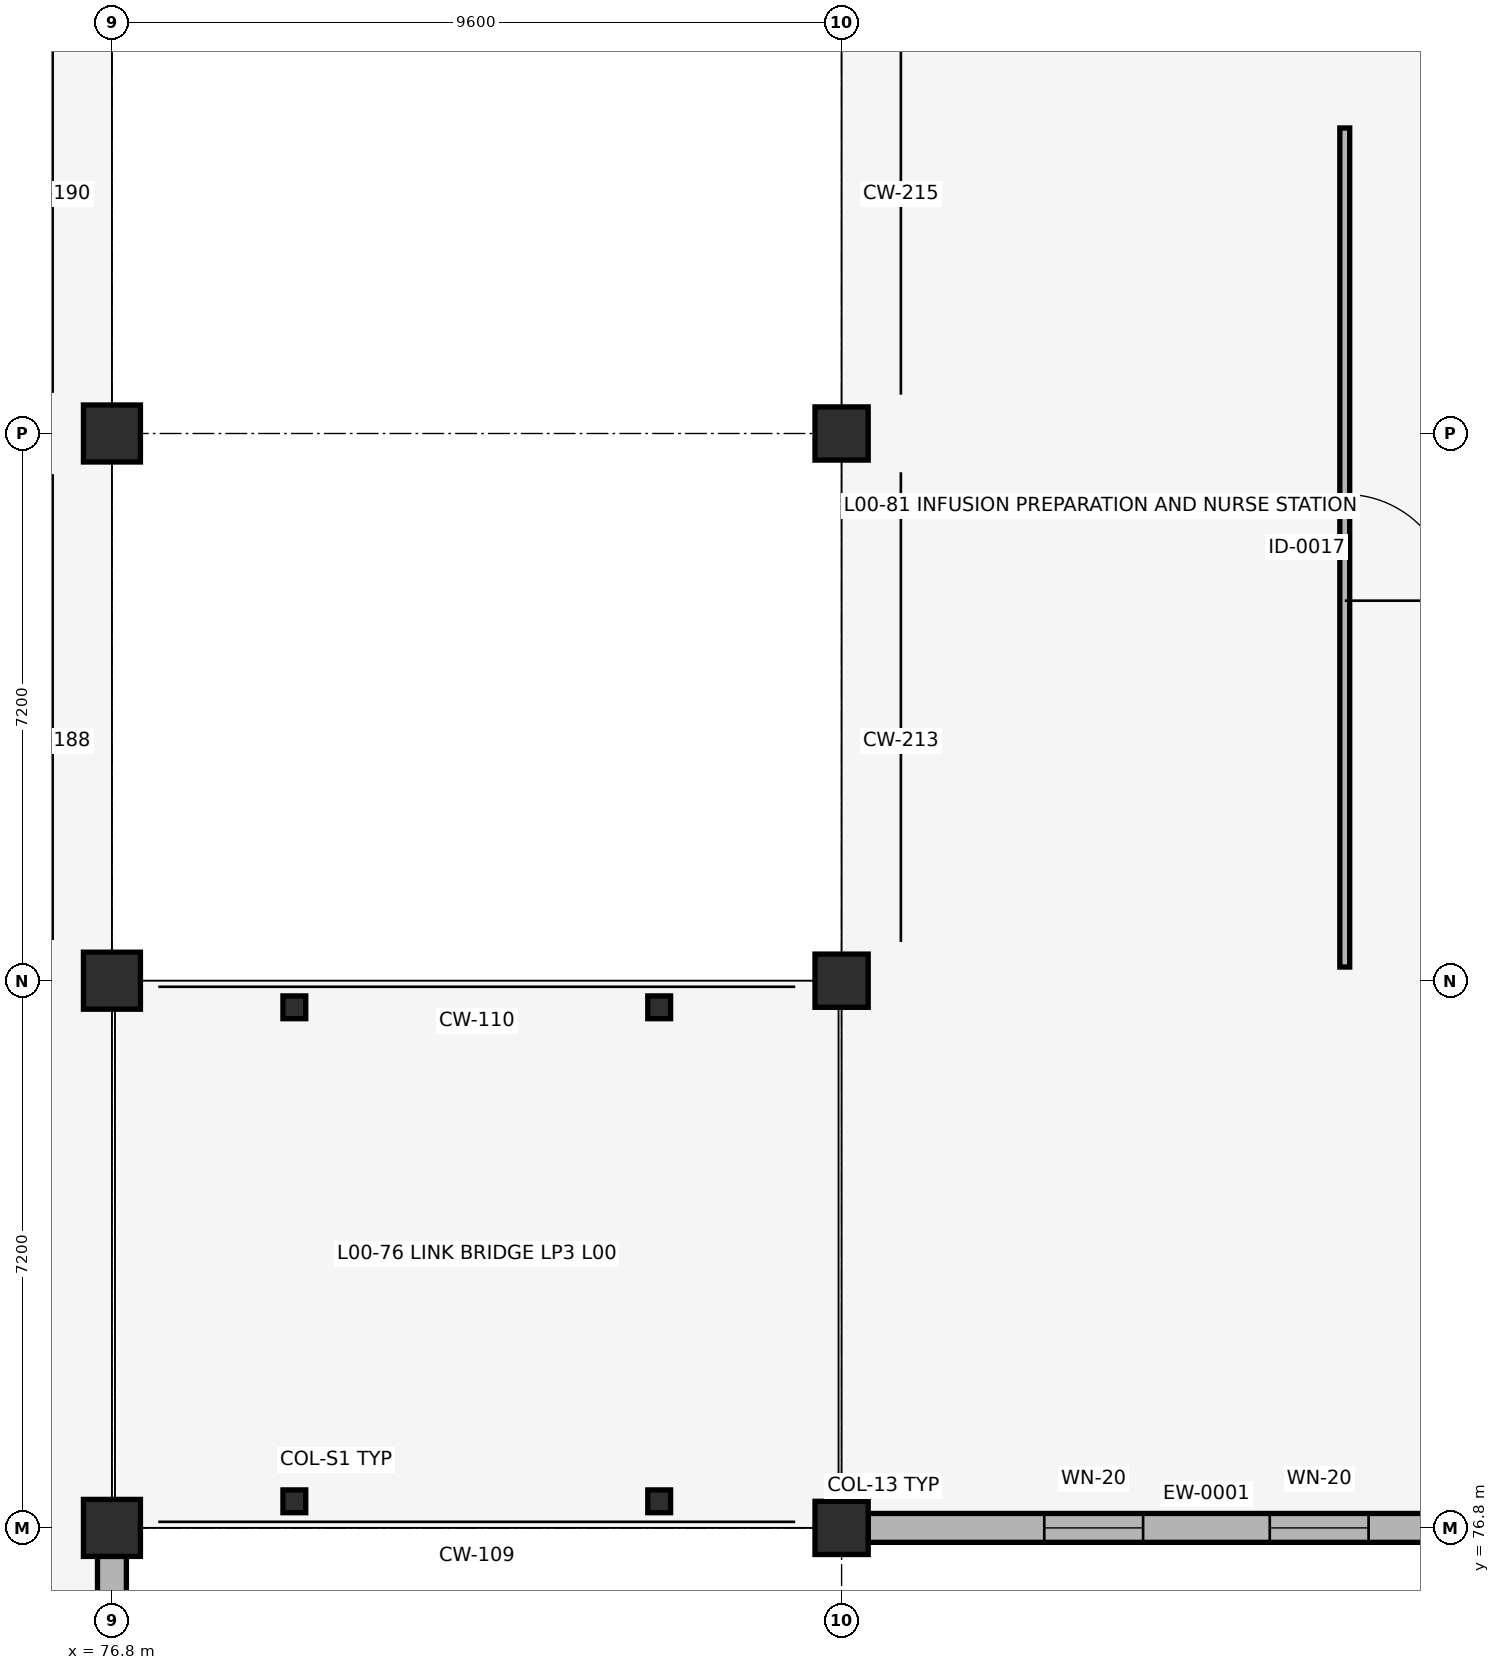
"""IFC4 building model, lengths in metres.
Left out: names, types, materials, properties, quantities, classifications, styles, units other than length and angle.
Written with IfcOpenShell. Run it as: python <this file> out.ifc"""

import sys

from ifc_helpers import new_model, si_unit, direction, frame, frame_2d, origin, origin_2d, place, context, subcontext, project, spatial, rectangle, circle, i_section, extrude, element, fill, save


model = new_model("IFC4")
c1 = context("Model", 3, precision=1e-05, world=origin(), true_north=direction((0.0, 1.0)))
c2 = subcontext(c1, "Body", "Model", "MODEL_VIEW")
j1 = project(units=[si_unit("LENGTHUNIT", "METRE"), si_unit("PLANEANGLEUNIT", "RADIAN")], contexts=[c1])
p1 = place(None, origin())
s1 = spatial("IfcSite", under=j1, at=p1, CompositionType="ELEMENT")
p2 = place(p1, origin())
s2 = spatial("IfcBuilding", under=s1, at=p2, CompositionType="ELEMENT")
p3 = place(p2, origin())
s3 = spatial("IfcBuildingStorey", under=s2, at=p3, CompositionType="ELEMENT", Elevation=0.0)
for number, where, z_axis, x_axis in (
    (1, (76.8, 76.8, -0.44), (0.0, 0.0, 1.0), (1.0, 0.0, 0.0)),
    (2, (76.8, 84.0, -0.44), (0.0, 0.0, 1.0), (1.0, 0.0, 0.0)),
    (3, (76.8, 91.2, -0.44), (0.0, 0.0, 1.0), (1.0, 0.0, 0.0)),
):
    element("IfcColumn", number, at=place(p3, frame(where, z_axis=z_axis, x_axis=x_axis)), inside=s3, PredefinedType="COLUMN", context=c2, shape_type="SweptSolid", body=[
        extrude(circle(Radius=0.375, at=origin_2d()), origin(), (0.0, 0.0, 1.0), 4.86),
    ])
for number, where, z_axis, x_axis in (
    (4, (79.2, 77.15, -0.44), (0.0, 0.0, 1.0), (1.0, 0.0, 0.0)),
    (5, (79.2, 83.65, -0.44), (0.0, 0.0, 1.0), (1.0, 0.0, 0.0)),
    (6, (84.0, 77.15, -0.44), (0.0, 0.0, 1.0), (1.0, 0.0, 0.0)),
    (7, (84.0, 83.65, -0.44), (0.0, 0.0, 1.0), (1.0, 0.0, 0.0)),
):
    element("IfcColumn", number, at=place(p3, frame(where, z_axis=z_axis, x_axis=x_axis)), inside=s3, PredefinedType="COLUMN", context=c2, shape_type="SweptSolid", body=[
        extrude(i_section(OverallWidth=0.3, OverallDepth=0.3, WebThickness=0.011, FlangeThickness=0.019, FilletRadius=0.027, at=origin_2d()), origin(), (0.0, 0.0, 1.0), 4.86),
    ])
for number, where, z_axis, x_axis in (
    (8, (86.4, 76.8, -0.44), (0.0, 0.0, 1.0), (1.0, 0.0, 0.0)),
    (9, (86.4, 84.0, -0.44), (0.0, 0.0, 1.0), (1.0, 0.0, 0.0)),
    (10, (86.4, 91.2, -0.44), (0.0, 0.0, 1.0), (1.0, 0.0, 0.0)),
):
    element("IfcColumn", number, at=place(p3, frame(where, z_axis=z_axis, x_axis=x_axis)), inside=s3, PredefinedType="COLUMN", context=c2, shape_type="SweptSolid", body=[
        extrude(circle(Radius=0.35, at=origin_2d()), origin(), (0.0, 0.0, 1.0), 4.86),
    ])
p4 = place(p3, frame((86.75, 76.8, 0.0), z_axis=(0.0, 0.0, 1.0), x_axis=(1.0, 0.0, 0.0)))
e11 = element("IfcWall", 11, at=p4, inside=s3, PredefinedType="SOLIDWALL", context=c2, shape_type="SweptSolid", body=[
    extrude(rectangle(XDim=8.9, YDim=0.38, at=frame_2d((4.45, 0.0))), origin(), (0.0, 0.0, 1.0), 3.37),
])
p5 = place(p4, frame((2.317, 0.0, 0.72)))
e12 = element("IfcOpeningElement", 12, at=p5, cuts=e11, PredefinedType="OPENING", context=c2, shape_type="SweptSolid", body=[
    extrude(rectangle(XDim=1.3, YDim=2.32, at=frame_2d((0.65, 1.16))), frame((0.0, 0.2, 0.0), z_axis=(0.0, -1.0, 0.0), x_axis=(1.0, 0.0, 0.0)), (0.0, 0.0, 1.0), 0.4),
])
p6 = place(p4, frame((5.283, 0.0, 0.72)))
e13 = element("IfcOpeningElement", 13, at=p6, cuts=e11, PredefinedType="OPENING", context=c2, shape_type="SweptSolid", body=[
    extrude(rectangle(XDim=1.3, YDim=2.32, at=frame_2d((0.65, 1.16))), frame((0.0, 0.2, 0.0), z_axis=(0.0, -1.0, 0.0), x_axis=(1.0, 0.0, 0.0)), (0.0, 0.0, 1.0), 0.4),
])
p7 = place(p3, frame((76.8, 69.975, 0.0), z_axis=(0.0, 0.0, 1.0), x_axis=(0.0, 1.0, 0.0)))
e14 = element("IfcWall", 14, at=p7, inside=s3, PredefinedType="SOLIDWALL", context=c2, shape_type="SweptSolid", body=[
    extrude(rectangle(XDim=6.45, YDim=0.38, at=frame_2d((3.225, 0.0))), origin(), (0.0, 0.0, 1.0), 3.42),
])
p8 = place(p7, frame((2.575, 0.0, 0.72)))
e15 = element("IfcOpeningElement", 15, at=p8, cuts=e14, PredefinedType="OPENING", context=c2, shape_type="SweptSolid", body=[
    extrude(rectangle(XDim=1.3, YDim=2.32, at=frame_2d((0.65, 1.16))), frame((0.0, 0.2, 0.0), z_axis=(0.0, -1.0, 0.0), x_axis=(1.0, 0.0, 0.0)), (0.0, 0.0, 1.0), 0.4),
])
p9 = place(p3, frame((93.02, 84.18, 0.0), z_axis=(0.0, 0.0, 1.0), x_axis=(0.0, 1.0, 0.0)))
e16 = element("IfcWall", 16, at=p9, inside=s3, PredefinedType="PARTITIONING", context=c2, shape_type="SweptSolid", body=[
    extrude(rectangle(XDim=11.04, YDim=0.13, at=frame_2d((5.52, 0.0))), origin(), (0.0, 0.0, 1.0), 3.42),
])
p10 = place(p9, frame((4.82, 0.0, 0.0)))
e17 = element("IfcOpeningElement", 17, at=p10, cuts=e16, PredefinedType="OPENING", context=c2, shape_type="SweptSolid", body=[
    extrude(rectangle(XDim=1.4, YDim=2.12, at=frame_2d((0.7, 1.06))), frame((0.0, 0.075, 0.0), z_axis=(0.0, -1.0, 0.0), x_axis=(1.0, 0.0, 0.0)), (0.0, 0.0, 1.0), 0.15),
])
p11 = place(p5, origin())
e18 = element("IfcWindow", 18, at=p11, inside=s3, PartitioningType="SINGLE_PANEL", PredefinedType="WINDOW", context=c2, shape_type="SweptSolid", body=[
    extrude(rectangle(XDim=1.3, YDim=2.32, at=frame_2d((0.65, 1.16))), frame((0.0, 0.03, 0.0), z_axis=(0.0, -1.0, 0.0), x_axis=(1.0, 0.0, 0.0)), (0.0, 0.0, 1.0), 0.06),
])
fill(e12, e18)
p12 = place(p6, origin())
e19 = element("IfcWindow", 19, at=p12, inside=s3, PartitioningType="SINGLE_PANEL", PredefinedType="WINDOW", context=c2, shape_type="SweptSolid", body=[
    extrude(rectangle(XDim=1.3, YDim=2.32, at=frame_2d((0.65, 1.16))), frame((0.0, 0.03, 0.0), z_axis=(0.0, -1.0, 0.0), x_axis=(1.0, 0.0, 0.0)), (0.0, 0.0, 1.0), 0.06),
])
fill(e13, e19)
p13 = place(p10, origin())
e20 = element("IfcDoor", 20, at=p13, inside=s3, OperationType="SINGLE_SWING_RIGHT", PredefinedType="DOOR", context=c2, shape_type="SweptSolid", body=[
    extrude(rectangle(XDim=1.4, YDim=2.12, at=frame_2d((0.7, 1.06))), frame((0.0, 0.025, 0.0), z_axis=(0.0, -1.0, 0.0), x_axis=(1.0, 0.0, 0.0)), (0.0, 0.0, 1.0), 0.05),
])
fill(e17, e20)
save(model, sys.argv[1])
